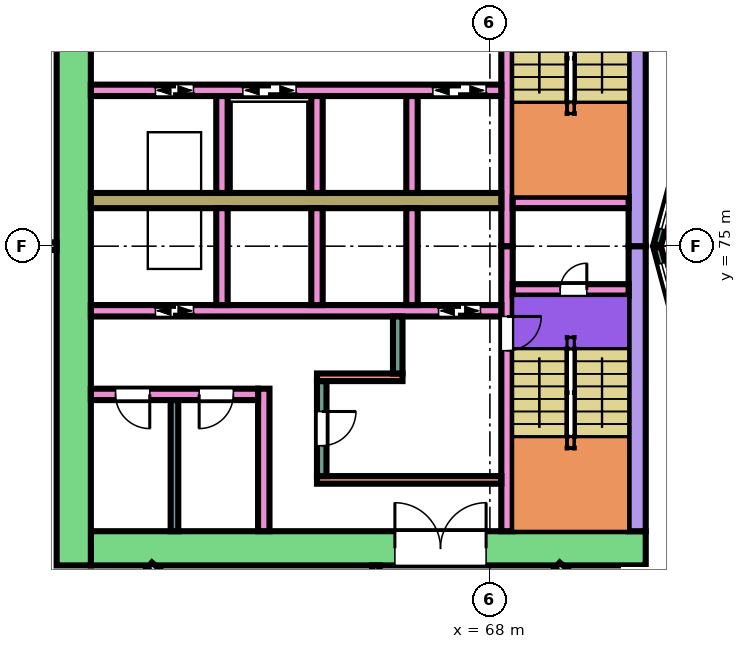
"""IFC4 building model, lengths in metres.
Left out: names, types, materials, properties, quantities, classifications, styles, units other than length and angle.
Written with IfcOpenShell. Run it as: python <this file> out.ifc"""

import sys

from ifc_helpers import new_model, si_unit, direction, frame, frame_2d, origin, place, context, subcontext, project, spatial, rectangle, extrude, element, fill, save


model = new_model("IFC4")
c1 = context("Model", 3, precision=1e-05, world=origin(), true_north=direction((0.0, 1.0)))
c2 = subcontext(c1, "Body", "Model", "MODEL_VIEW")
j1 = project(units=[si_unit("LENGTHUNIT", "METRE"), si_unit("PLANEANGLEUNIT", "RADIAN")], contexts=[c1])
p1 = place(None, origin())
s1 = spatial("IfcSite", under=j1, at=p1, CompositionType="ELEMENT")
p2 = place(p1, origin())
s2 = spatial("IfcBuilding", under=s1, at=p2, CompositionType="ELEMENT")
p3 = place(p2, frame((0.0, 0.0, 12.4)))
s3 = spatial("IfcBuildingStorey", under=s2, at=p3, CompositionType="ELEMENT", Elevation=12.4)
p4 = place(p3, frame((72.1, 67.05, 0.0), z_axis=(0.0, 0.0, 1.0), x_axis=(-1.0, 0.0, 0.0)))
e1 = element("IfcWall", 1, at=p4, inside=s3, PredefinedType="SHEAR", context=c2, shape_type="SweptSolid", body=[
    extrude(rectangle(XDim=14.6, YDim=0.9, at=frame_2d((7.3, 0.0))), origin(), (0.0, 0.0, 1.0), 4.95),
])
p5 = place(p4, frame((4.2, 0.0, 0.0)))
e2 = element("IfcOpeningElement", 2, at=p5, cuts=e1, PredefinedType="OPENING", context=c2, shape_type="SweptSolid", body=[
    extrude(rectangle(XDim=2.4, YDim=2.4, at=frame_2d((1.2, 1.2))), frame((0.0, 0.46, 0.0), z_axis=(0.0, -1.0, 0.0), x_axis=(1.0, 0.0, 0.0)), (0.0, 0.0, 1.0), 0.92),
])
for number, where, z_axis, x_axis in (
    (3, (71.875, 75.0, 0.0), (0.0, 0.0, 1.0), (0.0, -1.0, 0.0)),
    (4, (71.875, 82.5, 0.0), (0.0, 0.0, 1.0), (0.0, -1.0, 0.0)),
):
    element("IfcWall", number, at=place(p3, frame(where, z_axis=z_axis, x_axis=x_axis)), inside=s3, PredefinedType="SHEAR", context=c2, shape_type="SweptSolid", body=[
        extrude(rectangle(XDim=7.5, YDim=0.45, at=frame_2d((3.75, 0.0))), origin(), (0.0, 0.0, 1.0), 4.95),
    ])
p6 = place(p3, frame((57.05, 83.4, 0.0), z_axis=(0.0, 0.0, 1.0), x_axis=(0.0, -1.0, 0.0)))
e5 = element("IfcWall", 5, at=p6, inside=s3, PredefinedType="SHEAR", context=c2, shape_type="SweptSolid", body=[
    extrude(rectangle(XDim=16.8, YDim=0.9, at=frame_2d((8.4, 0.0))), origin(), (0.0, 0.0, 1.0), 4.95),
])
p7 = place(p3, frame((68.45, 75.0, 0.0), z_axis=(0.0, 0.0, 1.0), x_axis=(0.0, -1.0, 0.0)))
e6 = element("IfcWall", 6, at=p7, inside=s3, PredefinedType="SHEAR", context=c2, shape_type="SweptSolid", body=[
    extrude(rectangle(XDim=7.5, YDim=0.3, at=frame_2d((3.75, 0.0))), origin(), (0.0, 0.0, 1.0), 4.95),
])
p8 = place(p7, frame((1.85, 0.0, 0.0)))
e7 = element("IfcOpeningElement", 7, at=p8, cuts=e6, PredefinedType="OPENING", context=c2, shape_type="SweptSolid", body=[
    extrude(rectangle(XDim=0.9, YDim=2.1, at=frame_2d((0.45, 1.05))), frame((0.0, 0.16, 0.0), z_axis=(0.0, -1.0, 0.0), x_axis=(1.0, 0.0, 0.0)), (0.0, 0.0, 1.0), 0.32),
])
p9 = place(p3, frame((68.45, 82.5, 0.0), z_axis=(0.0, 0.0, 1.0), x_axis=(0.0, -1.0, 0.0)))
e8 = element("IfcWall", 8, at=p9, inside=s3, PredefinedType="SHEAR", context=c2, shape_type="SweptSolid", body=[
    extrude(rectangle(XDim=7.5, YDim=0.3, at=frame_2d((3.75, 0.0))), origin(), (0.0, 0.0, 1.0), 4.95),
])
p10 = place(p9, frame((0.15, 0.0, 0.0)))
e9 = element("IfcOpeningElement", 9, at=p10, cuts=e8, PredefinedType="OPENING", context=c2, shape_type="SweptSolid", body=[
    extrude(rectangle(XDim=0.9, YDim=2.1, at=frame_2d((0.45, 1.05))), frame((0.0, 0.16, 0.0), z_axis=(0.0, -1.0, 0.0), x_axis=(1.0, 0.0, 0.0)), (0.0, 0.0, 1.0), 0.32),
])
p11 = place(p3, frame((71.65, 73.85, 0.0), z_axis=(0.0, 0.0, 1.0), x_axis=(-1.0, 0.0, 0.0)))
e10 = element("IfcWall", 10, at=p11, inside=s3, PredefinedType="SHEAR", context=c2, shape_type="SweptSolid", body=[
    extrude(rectangle(XDim=3.05, YDim=0.3, at=frame_2d((1.525, 0.0))), origin(), (0.0, 0.0, 1.0), 4.95),
])
p12 = place(p11, frame((1.1, 0.0, 0.0)))
e11 = element("IfcOpeningElement", 11, at=p12, cuts=e10, PredefinedType="OPENING", context=c2, shape_type="SweptSolid", body=[
    extrude(rectangle(XDim=0.7, YDim=2.0, at=frame_2d((0.35, 1.0))), frame((0.0, 0.16, 0.0), z_axis=(0.0, -1.0, 0.0), x_axis=(1.0, 0.0, 0.0)), (0.0, 0.0, 1.0), 0.32),
])
p13 = place(p3, frame((71.65, 76.15, 0.0), z_axis=(0.0, 0.0, 1.0), x_axis=(-1.0, 0.0, 0.0)))
e12 = element("IfcWall", 12, at=p13, inside=s3, PredefinedType="SHEAR", context=c2, shape_type="SweptSolid", body=[
    extrude(rectangle(XDim=3.05, YDim=0.3, at=frame_2d((1.525, 0.0))), origin(), (0.0, 0.0, 1.0), 4.95),
])
p14 = place(p3, frame((68.3, 73.3, 0.0), z_axis=(0.0, 0.0, 1.0), x_axis=(-1.0, 0.0, 0.0)))
e13 = element("IfcWall", 13, at=p14, inside=s3, PredefinedType="SHEAR", context=c2, shape_type="SweptSolid", body=[
    extrude(rectangle(XDim=10.8, YDim=0.3, at=frame_2d((5.4, 0.0))), origin(), (0.0, 0.0, 1.0), 4.95),
])
p15 = place(p14, frame((0.55, 0.0, 0.0)))
e14 = element("IfcOpeningElement", 14, at=p15, cuts=e13, PredefinedType="OPENING", context=c2, shape_type="SweptSolid", body=[
    extrude(rectangle(XDim=1.1, YDim=2.1, at=frame_2d((0.55, 1.05))), frame((0.0, 0.16, 0.0), z_axis=(0.0, -1.0, 0.0), x_axis=(1.0, 0.0, 0.0)), (0.0, 0.0, 1.0), 0.32),
])
p16 = place(p14, frame((8.1, 0.0, 0.0)))
e15 = element("IfcOpeningElement", 15, at=p16, cuts=e13, PredefinedType="OPENING", context=c2, shape_type="SweptSolid", body=[
    extrude(rectangle(XDim=1.0, YDim=2.1, at=frame_2d((0.5, 1.05))), frame((0.0, 0.16, 0.0), z_axis=(0.0, -1.0, 0.0), x_axis=(1.0, 0.0, 0.0)), (0.0, 0.0, 1.0), 0.32),
])
p17 = place(p3, frame((68.3, 76.2, 0.0), z_axis=(0.0, 0.0, 1.0), x_axis=(-1.0, 0.0, 0.0)))
e16 = element("IfcWall", 16, at=p17, inside=s3, PredefinedType="SHEAR", context=c2, shape_type="SweptSolid", body=[
    extrude(rectangle(XDim=10.8, YDim=0.4, at=frame_2d((5.4, 0.0))), origin(), (0.0, 0.0, 1.0), 4.95),
])
p18 = place(p3, frame((68.3, 79.1, 0.0), z_axis=(0.0, 0.0, 1.0), x_axis=(-1.0, 0.0, 0.0)))
e17 = element("IfcWall", 17, at=p18, inside=s3, PredefinedType="SHEAR", context=c2, shape_type="SweptSolid", body=[
    extrude(rectangle(XDim=10.8, YDim=0.3, at=frame_2d((5.4, 0.0))), origin(), (0.0, 0.0, 1.0), 4.95),
])
p19 = place(p18, frame((0.4, 0.0, 0.0)))
e18 = element("IfcOpeningElement", 18, at=p19, cuts=e17, PredefinedType="OPENING", context=c2, shape_type="SweptSolid", body=[
    extrude(rectangle(XDim=1.4, YDim=2.1, at=frame_2d((0.7, 1.05))), frame((0.0, 0.16, 0.0), z_axis=(0.0, -1.0, 0.0), x_axis=(1.0, 0.0, 0.0)), (0.0, 0.0, 1.0), 0.32),
])
p20 = place(p18, frame((5.4, 0.0, 0.0)))
e19 = element("IfcOpeningElement", 19, at=p20, cuts=e17, PredefinedType="OPENING", context=c2, shape_type="SweptSolid", body=[
    extrude(rectangle(XDim=1.4, YDim=2.1, at=frame_2d((0.7, 1.05))), frame((0.0, 0.16, 0.0), z_axis=(0.0, -1.0, 0.0), x_axis=(1.0, 0.0, 0.0)), (0.0, 0.0, 1.0), 0.32),
])
p21 = place(p18, frame((8.1, 0.0, 0.0)))
e20 = element("IfcOpeningElement", 20, at=p21, cuts=e17, PredefinedType="OPENING", context=c2, shape_type="SweptSolid", body=[
    extrude(rectangle(XDim=1.0, YDim=2.1, at=frame_2d((0.5, 1.05))), frame((0.0, 0.16, 0.0), z_axis=(0.0, -1.0, 0.0), x_axis=(1.0, 0.0, 0.0)), (0.0, 0.0, 1.0), 0.32),
])
for number, where, z_axis, x_axis in (
    (21, (65.95, 76.0, 0.0), (0.0, 0.0, 1.0), (0.0, -1.0, 0.0)),
    (22, (63.45, 76.0, 0.0), (0.0, 0.0, 1.0), (0.0, -1.0, 0.0)),
    (23, (60.95, 76.0, 0.0), (0.0, 0.0, 1.0), (0.0, -1.0, 0.0)),
    (24, (65.95, 78.95, 0.0), (0.0, 0.0, 1.0), (0.0, -1.0, 0.0)),
    (25, (63.45, 78.95, 0.0), (0.0, 0.0, 1.0), (0.0, -1.0, 0.0)),
    (26, (60.95, 78.95, 0.0), (0.0, 0.0, 1.0), (0.0, -1.0, 0.0)),
):
    element("IfcWall", number, at=place(p3, frame(where, z_axis=z_axis, x_axis=x_axis)), inside=s3, PredefinedType="SHEAR", context=c2, shape_type="SweptSolid", body=[
        extrude(rectangle(XDim=2.55, YDim=0.3, at=frame_2d((1.275, 0.0))), origin(), (0.0, 0.0, 1.0), 4.95),
    ])
p22 = place(p3, frame((68.3, 68.85, 0.0), z_axis=(0.0, 0.0, 1.0), x_axis=(-1.0, 0.0, 0.0)))
e27 = element("IfcWall", 27, at=p22, inside=s3, PredefinedType="SHEAR", context=c2, shape_type="SweptSolid", body=[
    extrude(rectangle(XDim=4.85, YDim=0.2, at=frame_2d((2.425, 0.0))), origin(), (0.0, 0.0, 1.0), 4.95),
])
p23 = place(p3, frame((63.575, 71.45, 0.0), z_axis=(0.0, 0.0, 1.0), x_axis=(0.0, -1.0, 0.0)))
e28 = element("IfcWall", 28, at=p23, inside=s3, PredefinedType="SHEAR", context=c2, shape_type="SweptSolid", body=[
    extrude(rectangle(XDim=2.5, YDim=0.25, at=frame_2d((1.25, 0.0))), origin(), (0.0, 0.0, 1.0), 4.95),
])
p24 = place(p23, frame((0.8, 0.0, 0.0)))
e29 = element("IfcOpeningElement", 29, at=p24, cuts=e28, PredefinedType="OPENING", context=c2, shape_type="SweptSolid", body=[
    extrude(rectangle(XDim=0.9, YDim=2.1, at=frame_2d((0.45, 1.05))), frame((0.0, 0.135, 0.0), z_axis=(0.0, -1.0, 0.0), x_axis=(1.0, 0.0, 0.0)), (0.0, 0.0, 1.0), 0.27),
])
p25 = place(p3, frame((65.7, 71.55, 0.0), z_axis=(0.0, 0.0, 1.0), x_axis=(-1.0, 0.0, 0.0)))
e30 = element("IfcWall", 30, at=p25, inside=s3, PredefinedType="SHEAR", context=c2, shape_type="SweptSolid", body=[
    extrude(rectangle(XDim=2.25, YDim=0.2, at=frame_2d((1.125, 0.0))), origin(), (0.0, 0.0, 1.0), 4.95),
])
p26 = place(p3, frame((65.575, 73.15, 0.0), z_axis=(0.0, 0.0, 1.0), x_axis=(0.0, -1.0, 0.0)))
e31 = element("IfcWall", 31, at=p26, inside=s3, PredefinedType="SHEAR", context=c2, shape_type="SweptSolid", body=[
    extrude(rectangle(XDim=1.5, YDim=0.25, at=frame_2d((0.75, 0.0))), origin(), (0.0, 0.0, 1.0), 4.95),
])
p27 = place(p3, frame((62.05, 71.25, 0.0), z_axis=(0.0, 0.0, 1.0), x_axis=(0.0, -1.0, 0.0)))
e32 = element("IfcWall", 32, at=p27, inside=s3, PredefinedType="SHEAR", context=c2, shape_type="SweptSolid", body=[
    extrude(rectangle(XDim=3.75, YDim=0.3, at=frame_2d((1.875, 0.0))), origin(), (0.0, 0.0, 1.0), 4.95),
])
p28 = place(p3, frame((61.9, 71.1, 0.0), z_axis=(0.0, 0.0, 1.0), x_axis=(-1.0, 0.0, 0.0)))
e33 = element("IfcWall", 33, at=p28, inside=s3, PredefinedType="SHEAR", context=c2, shape_type="SweptSolid", body=[
    extrude(rectangle(XDim=4.4, YDim=0.3, at=frame_2d((2.2, 0.0))), origin(), (0.0, 0.0, 1.0), 4.95),
])
p29 = place(p28, frame((0.65, 0.0, 0.0)))
e34 = element("IfcOpeningElement", 34, at=p29, cuts=e33, PredefinedType="OPENING", context=c2, shape_type="SweptSolid", body=[
    extrude(rectangle(XDim=0.9, YDim=2.1, at=frame_2d((0.45, 1.05))), frame((0.0, 0.16, 0.0), z_axis=(0.0, -1.0, 0.0), x_axis=(1.0, 0.0, 0.0)), (0.0, 0.0, 1.0), 0.32),
])
p30 = place(p28, frame((2.85, 0.0, 0.0)))
e35 = element("IfcOpeningElement", 35, at=p30, cuts=e33, PredefinedType="OPENING", context=c2, shape_type="SweptSolid", body=[
    extrude(rectangle(XDim=0.9, YDim=2.1, at=frame_2d((0.45, 1.05))), frame((0.0, 0.16, 0.0), z_axis=(0.0, -1.0, 0.0), x_axis=(1.0, 0.0, 0.0)), (0.0, 0.0, 1.0), 0.32),
])
p31 = place(p3, frame((73.415, 78.802, 0.0), z_axis=(0.0, 0.0, 1.0), x_axis=(-0.258789828301, -0.965933654434, 0.0)))
e36 = element("IfcWall", 36, at=p31, inside=s3, PredefinedType="NOTDEFINED", context=c2, shape_type="SweptSolid", body=[
    extrude(rectangle(XDim=3.936, YDim=0.2, at=frame_2d((1.968, 0.0))), origin(), (0.0, 0.0, 1.0), 5.4),
])
p32 = place(p31, frame((0.468, 0.0, 0.9)))
e37 = element("IfcOpeningElement", 37, at=p32, cuts=e36, PredefinedType="OPENING", context=c2, shape_type="SweptSolid", body=[
    extrude(rectangle(XDim=3.0, YDim=2.3, at=frame_2d((1.5, 1.15))), frame((0.0, 0.11, 0.0), z_axis=(0.0, -1.0, 0.0), x_axis=(1.0, 0.0, 0.0)), (0.0, 0.0, 1.0), 0.22),
])
p33 = place(p3, frame((72.396, 75.0, 0.0), z_axis=(0.0, 0.0, 1.0), x_axis=(0.258789828301, -0.965933654434, 0.0)))
e38 = element("IfcWall", 38, at=p33, inside=s3, PredefinedType="NOTDEFINED", context=c2, shape_type="SweptSolid", body=[
    extrude(rectangle(XDim=3.936, YDim=0.2, at=frame_2d((1.968, 0.0))), origin(), (0.0, 0.0, 1.0), 5.4),
])
p34 = place(p33, frame((0.468, 0.0, 0.9)))
e39 = element("IfcOpeningElement", 39, at=p34, cuts=e38, PredefinedType="OPENING", context=c2, shape_type="SweptSolid", body=[
    extrude(rectangle(XDim=3.0, YDim=2.3, at=frame_2d((1.5, 1.15))), frame((0.0, 0.11, 0.0), z_axis=(0.0, -1.0, 0.0), x_axis=(1.0, 0.0, 0.0)), (0.0, 0.0, 1.0), 0.22),
])
p35 = place(p3, frame((44.204, 75.0, 0.0), z_axis=(0.0, 0.0, 1.0), x_axis=(1.0, 0.0, 0.0)))
e40 = element("IfcWall", 40, at=p35, inside=s3, PredefinedType="PARTITIONING", context=c2, shape_type="SweptSolid", body=[
    extrude(rectangle(XDim=12.394, YDim=0.2, at=frame_2d((6.197, 0.0))), origin(), (0.0, 0.0, 1.0), 3.75),
])
p36 = place(p3, frame((59.041, 66.6, 0.0), z_axis=(0.0, 0.0, 1.0), x_axis=(0.757842003705, -0.652438117695, 0.0)))
e41 = element("IfcWall", 41, at=p36, inside=s3, PredefinedType="PARTITIONING", context=c2, shape_type="SweptSolid", body=[
    extrude(rectangle(XDim=8.795, YDim=0.2, at=frame_2d((4.397, 0.0))), origin(), (0.0, 0.0, 1.0), 4.95),
])
p37 = place(p36, frame((1.614, 0.0, 0.0)))
e42 = element("IfcOpeningElement", 42, at=p37, cuts=e41, PredefinedType="OPENING", context=c2, shape_type="SweptSolid", body=[
    extrude(rectangle(XDim=0.9, YDim=2.1, at=frame_2d((0.45, 1.05))), frame((0.0, 0.11, 0.0), z_axis=(0.0, -1.0, 0.0), x_axis=(1.0, 0.0, 0.0)), (0.0, 0.0, 1.0), 0.22),
])
p38 = place(p36, frame((4.222, 0.0, 0.0)))
e43 = element("IfcOpeningElement", 43, at=p38, cuts=e41, PredefinedType="OPENING", context=c2, shape_type="SweptSolid", body=[
    extrude(rectangle(XDim=0.9, YDim=2.1, at=frame_2d((0.45, 1.05))), frame((0.0, 0.11, 0.0), z_axis=(0.0, -1.0, 0.0), x_axis=(1.0, 0.0, 0.0)), (0.0, 0.0, 1.0), 0.22),
])
p39 = place(p36, frame((7.061, 0.0, 0.0)))
e44 = element("IfcOpeningElement", 44, at=p39, cuts=e41, PredefinedType="OPENING", context=c2, shape_type="SweptSolid", body=[
    extrude(rectangle(XDim=0.9, YDim=2.1, at=frame_2d((0.45, 1.05))), frame((0.0, 0.11, 0.0), z_axis=(0.0, -1.0, 0.0), x_axis=(1.0, 0.0, 0.0)), (0.0, 0.0, 1.0), 0.22),
])
p40 = place(p3, frame((65.0, 65.2, 0.0), z_axis=(0.0, 0.0, 1.0), x_axis=(0.0, 1.0, 0.0)))
e45 = element("IfcWall", 45, at=p40, inside=s3, PredefinedType="PARTITIONING", context=c2, shape_type="SweptSolid", body=[
    extrude(rectangle(XDim=1.399, YDim=0.2, at=frame_2d((0.7, 0.0))), origin(), (0.0, 0.0, 1.0), 4.95),
])
p41 = place(p3, frame((69.771, 66.6, 0.0), z_axis=(0.0, 0.0, 1.0), x_axis=(0.758040611529, -0.652207352974, 0.0)))
e46 = element("IfcWall", 46, at=p41, inside=s3, PredefinedType="PARTITIONING", context=c2, shape_type="SweptSolid", body=[
    extrude(rectangle(XDim=4.625, YDim=0.2, at=frame_2d((2.312, 0.0))), origin(), (0.0, 0.0, 1.0), 4.95),
])
p42 = place(p41, frame((1.887, 0.0, 0.0)))
e47 = element("IfcOpeningElement", 47, at=p42, cuts=e46, PredefinedType="OPENING", context=c2, shape_type="SweptSolid", body=[
    extrude(rectangle(XDim=0.9, YDim=2.1, at=frame_2d((0.45, 1.05))), frame((0.0, 0.11, 0.0), z_axis=(0.0, -1.0, 0.0), x_axis=(1.0, 0.0, 0.0)), (0.0, 0.0, 1.0), 0.22),
])
p43 = place(p3, frame((59.7, 70.95, 0.0), z_axis=(0.0, 0.0, 1.0), x_axis=(0.0, -1.0, 0.0)))
e48 = element("IfcWall", 48, at=p43, inside=s3, PredefinedType="PARTITIONING", context=c2, shape_type="SweptSolid", body=[
    extrude(rectangle(XDim=3.45, YDim=0.2, at=frame_2d((1.725, 0.0))), origin(), (0.0, 0.0, 1.0), 4.95),
])
p44 = place(p32, origin())
e49 = element("IfcWindow", 49, at=p44, inside=s3, PartitioningType="SINGLE_PANEL", PredefinedType="WINDOW", context=c2, shape_type="SweptSolid", body=[
    extrude(rectangle(XDim=3.0, YDim=2.3, at=frame_2d((1.5, 1.15))), frame((0.0, 0.03, 0.0), z_axis=(0.0, -1.0, 0.0), x_axis=(1.0, 0.0, 0.0)), (0.0, 0.0, 1.0), 0.06),
])
fill(e37, e49)
p45 = place(p34, origin())
e50 = element("IfcWindow", 50, at=p45, inside=s3, PartitioningType="SINGLE_PANEL", PredefinedType="WINDOW", context=c2, shape_type="SweptSolid", body=[
    extrude(rectangle(XDim=3.0, YDim=2.3, at=frame_2d((1.5, 1.15))), frame((0.0, 0.03, 0.0), z_axis=(0.0, -1.0, 0.0), x_axis=(1.0, 0.0, 0.0)), (0.0, 0.0, 1.0), 0.06),
])
fill(e39, e50)
p46 = place(p12, frame((0.7, 0.0, 0.0), z_axis=(0.0, 0.0, 1.0), x_axis=(-1.0, 0.0, 0.0)))
e51 = element("IfcDoor", 51, at=p46, inside=s3, OperationType="SINGLE_SWING_RIGHT", PredefinedType="DOOR", context=c2, shape_type="SweptSolid", body=[
    extrude(rectangle(XDim=0.7, YDim=2.0, at=frame_2d((0.35, 1.0))), frame((0.0, 0.025, 0.0), z_axis=(0.0, -1.0, 0.0), x_axis=(1.0, 0.0, 0.0)), (0.0, 0.0, 1.0), 0.05),
])
fill(e11, e51)
p47 = place(p8, origin())
e52 = element("IfcDoor", 52, at=p47, inside=s3, OperationType="SINGLE_SWING_LEFT", PredefinedType="DOOR", context=c2, shape_type="SweptSolid", body=[
    extrude(rectangle(XDim=0.9, YDim=2.1, at=frame_2d((0.45, 1.05))), frame((0.0, 0.025, 0.0), z_axis=(0.0, -1.0, 0.0), x_axis=(1.0, 0.0, 0.0)), (0.0, 0.0, 1.0), 0.05),
])
fill(e7, e52)
p48 = place(p15, origin())
e53 = element("IfcDoor", 53, at=p48, inside=s3, OperationType="DOUBLE_DOOR_SLIDING", PredefinedType="DOOR", context=c2, shape_type="SweptSolid", body=[
    extrude(rectangle(XDim=1.1, YDim=2.1, at=frame_2d((0.55, 1.05))), frame((0.0, 0.025, 0.0), z_axis=(0.0, -1.0, 0.0), x_axis=(1.0, 0.0, 0.0)), (0.0, 0.0, 1.0), 0.05),
])
fill(e14, e53)
p49 = place(p16, origin())
e54 = element("IfcDoor", 54, at=p49, inside=s3, OperationType="DOUBLE_DOOR_SLIDING", PredefinedType="DOOR", context=c2, shape_type="SweptSolid", body=[
    extrude(rectangle(XDim=1.0, YDim=2.1, at=frame_2d((0.5, 1.05))), frame((0.0, 0.025, 0.0), z_axis=(0.0, -1.0, 0.0), x_axis=(1.0, 0.0, 0.0)), (0.0, 0.0, 1.0), 0.05),
])
fill(e15, e54)
p50 = place(p19, origin())
e55 = element("IfcDoor", 55, at=p50, inside=s3, OperationType="DOUBLE_DOOR_SLIDING", PredefinedType="DOOR", context=c2, shape_type="SweptSolid", body=[
    extrude(rectangle(XDim=1.4, YDim=2.1, at=frame_2d((0.7, 1.05))), frame((0.0, 0.025, 0.0), z_axis=(0.0, -1.0, 0.0), x_axis=(1.0, 0.0, 0.0)), (0.0, 0.0, 1.0), 0.05),
])
fill(e18, e55)
p51 = place(p20, origin())
e56 = element("IfcDoor", 56, at=p51, inside=s3, OperationType="DOUBLE_DOOR_SLIDING", PredefinedType="DOOR", context=c2, shape_type="SweptSolid", body=[
    extrude(rectangle(XDim=1.4, YDim=2.1, at=frame_2d((0.7, 1.05))), frame((0.0, 0.025, 0.0), z_axis=(0.0, -1.0, 0.0), x_axis=(1.0, 0.0, 0.0)), (0.0, 0.0, 1.0), 0.05),
])
fill(e19, e56)
p52 = place(p21, origin())
e57 = element("IfcDoor", 57, at=p52, inside=s3, OperationType="DOUBLE_DOOR_SLIDING", PredefinedType="DOOR", context=c2, shape_type="SweptSolid", body=[
    extrude(rectangle(XDim=1.0, YDim=2.1, at=frame_2d((0.5, 1.05))), frame((0.0, 0.025, 0.0), z_axis=(0.0, -1.0, 0.0), x_axis=(1.0, 0.0, 0.0)), (0.0, 0.0, 1.0), 0.05),
])
fill(e20, e57)
p53 = place(p24, origin())
e58 = element("IfcDoor", 58, at=p53, inside=s3, OperationType="SINGLE_SWING_LEFT", PredefinedType="DOOR", context=c2, shape_type="SweptSolid", body=[
    extrude(rectangle(XDim=0.9, YDim=2.1, at=frame_2d((0.45, 1.05))), frame((0.0, 0.025, 0.0), z_axis=(0.0, -1.0, 0.0), x_axis=(1.0, 0.0, 0.0)), (0.0, 0.0, 1.0), 0.05),
])
fill(e29, e58)
p54 = place(p29, origin())
e59 = element("IfcDoor", 59, at=p54, inside=s3, OperationType="SINGLE_SWING_RIGHT", PredefinedType="DOOR", context=c2, shape_type="SweptSolid", body=[
    extrude(rectangle(XDim=0.9, YDim=2.1, at=frame_2d((0.45, 1.05))), frame((0.0, 0.025, 0.0), z_axis=(0.0, -1.0, 0.0), x_axis=(1.0, 0.0, 0.0)), (0.0, 0.0, 1.0), 0.05),
])
fill(e34, e59)
p55 = place(p30, origin())
e60 = element("IfcDoor", 60, at=p55, inside=s3, OperationType="SINGLE_SWING_LEFT", PredefinedType="DOOR", context=c2, shape_type="SweptSolid", body=[
    extrude(rectangle(XDim=0.9, YDim=2.1, at=frame_2d((0.45, 1.05))), frame((0.0, 0.025, 0.0), z_axis=(0.0, -1.0, 0.0), x_axis=(1.0, 0.0, 0.0)), (0.0, 0.0, 1.0), 0.05),
])
fill(e35, e60)
p56 = place(p5, frame((2.4, 0.0, 0.0), z_axis=(0.0, 0.0, 1.0), x_axis=(-1.0, 0.0, 0.0)))
e61 = element("IfcDoor", 61, at=p56, inside=s3, OperationType="DOUBLE_DOOR_SINGLE_SWING", PredefinedType="DOOR", context=c2, shape_type="SweptSolid", body=[
    extrude(rectangle(XDim=2.4, YDim=2.4, at=frame_2d((1.2, 1.2))), frame((0.0, 0.025, 0.0), z_axis=(0.0, -1.0, 0.0), x_axis=(1.0, 0.0, 0.0)), (0.0, 0.0, 1.0), 0.05),
])
fill(e2, e61)
save(model, sys.argv[1])
